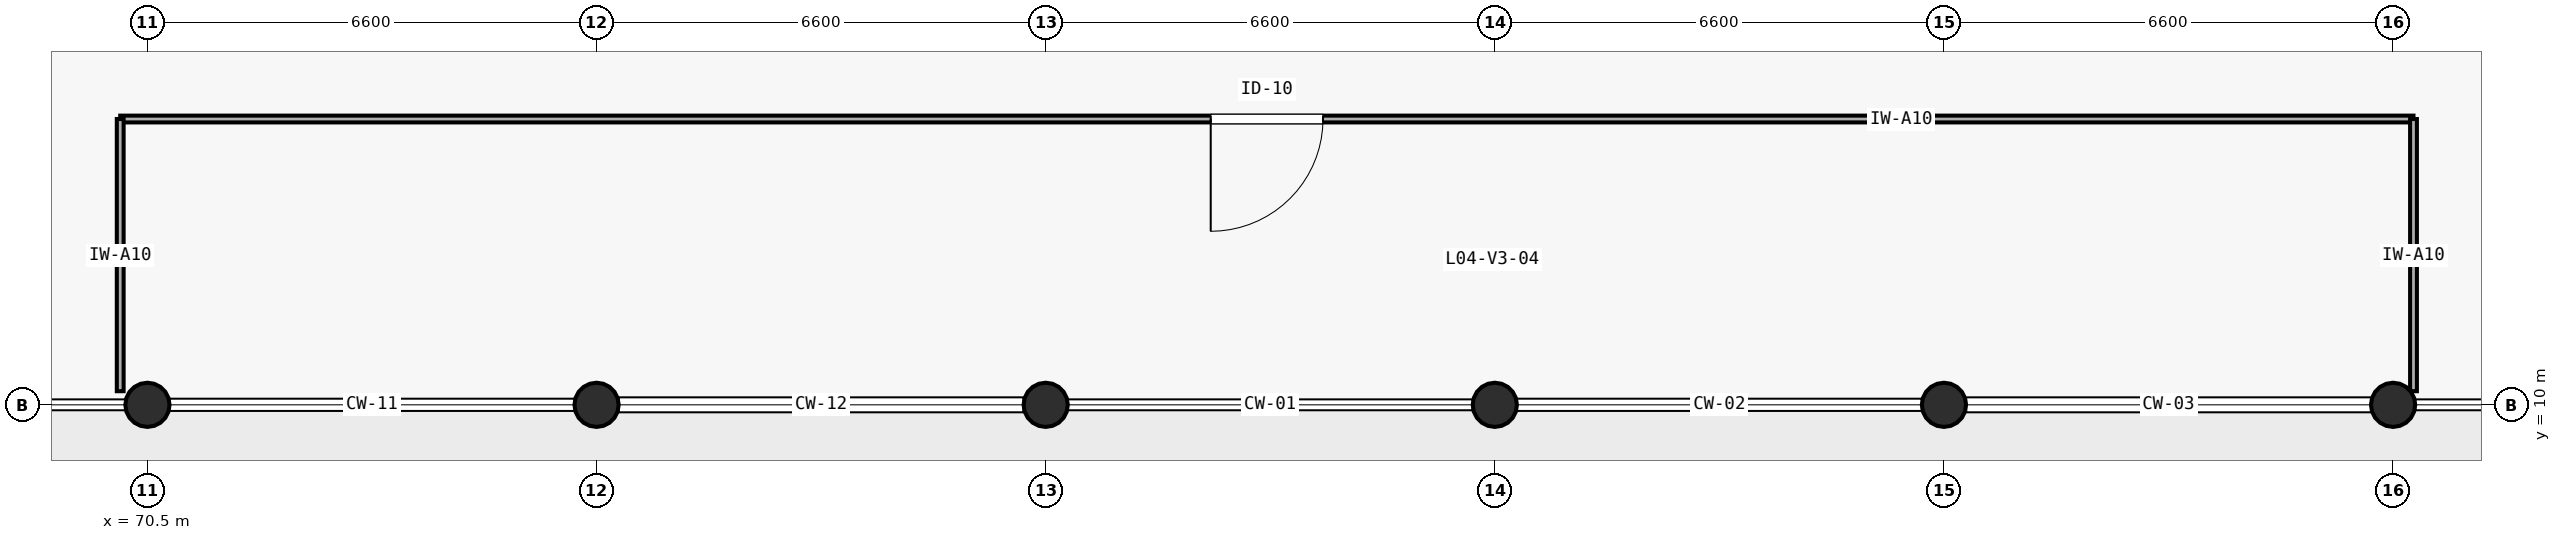
"""IFC4 building model, lengths in metres.
Left out: names, types, materials, properties, quantities, classifications, styles, units other than length and angle.
Written with IfcOpenShell. Run it as: python <this file> out.ifc"""

import sys

from ifc_helpers import new_model, si_unit, direction, frame, frame_2d, origin, origin_2d, place, context, subcontext, project, spatial, rectangle, circle, extrude, element, fill, save


model = new_model("IFC4")
c1 = context("Model", 3, precision=1e-05, world=origin(), true_north=direction((0.0, 1.0)))
c2 = subcontext(c1, "Body", "Model", "MODEL_VIEW")
j1 = project(units=[si_unit("LENGTHUNIT", "METRE"), si_unit("PLANEANGLEUNIT", "RADIAN")], contexts=[c1])
p1 = place(None, origin())
s1 = spatial("IfcSite", under=j1, at=p1, CompositionType="ELEMENT")
p2 = place(p1, origin())
s2 = spatial("IfcBuilding", under=s1, at=p2, CompositionType="ELEMENT")
p3 = place(p2, frame((0.0, 0.0, 16.8)))
s3 = spatial("IfcBuildingStorey", under=s2, at=p3, CompositionType="ELEMENT", Elevation=16.8)
for number, where, z_axis, x_axis in (
    (1, (70.5, 10.0, 0.0), (0.0, 0.0, 1.0), (1.0, 0.0, 0.0)),
    (2, (77.1, 10.0, 0.0), (0.0, 0.0, 1.0), (1.0, 0.0, 0.0)),
    (3, (83.7, 10.0, 0.0), (0.0, 0.0, 1.0), (1.0, 0.0, 0.0)),
    (4, (90.3, 10.0, 0.0), (0.0, 0.0, 1.0), (1.0, 0.0, 0.0)),
    (5, (96.9, 10.0, 0.0), (0.0, 0.0, 1.0), (1.0, 0.0, 0.0)),
    (6, (103.5, 10.0, 0.0), (0.0, 0.0, 1.0), (1.0, 0.0, 0.0)),
):
    element("IfcColumn", number, at=place(p3, frame(where, z_axis=z_axis, x_axis=x_axis)), inside=s3, PredefinedType="COLUMN", context=c2, shape_type="SweptSolid", body=[
        extrude(circle(Radius=0.325, at=origin_2d()), origin(), (0.0, 0.0, 1.0), 4.2),
    ])
p4 = place(p3, frame((70.1, 14.2, 0.0), z_axis=(0.0, 0.0, 1.0), x_axis=(1.0, 0.0, 0.0)))
e7 = element("IfcWall", 7, at=p4, inside=s3, PredefinedType="PARTITIONING", context=c2, shape_type="SweptSolid", body=[
    extrude(rectangle(XDim=33.7, YDim=0.1, at=frame_2d((16.85, 0.0))), origin(), (0.0, 0.0, 1.0), 3.9),
])
p5 = place(p4, frame((16.025, 0.0, 0.0)))
e8 = element("IfcOpeningElement", 8, at=p5, cuts=e7, PredefinedType="OPENING", context=c2, shape_type="SweptSolid", body=[
    extrude(rectangle(XDim=1.65, YDim=2.25, at=frame_2d((0.825, 1.125))), frame((0.0, 0.06, 0.0), z_axis=(0.0, -1.0, 0.0), x_axis=(1.0, 0.0, 0.0)), (0.0, 0.0, 1.0), 0.12),
])
for number, where, z_axis, x_axis in (
    (9, (70.1, 10.2, 0.0), (0.0, 0.0, 1.0), (0.0, 1.0, 0.0)),
    (10, (103.8, 10.2, 0.0), (0.0, 0.0, 1.0), (0.0, 1.0, 0.0)),
):
    element("IfcWall", number, at=place(p3, frame(where, z_axis=z_axis, x_axis=x_axis)), inside=s3, PredefinedType="PARTITIONING", context=c2, shape_type="SweptSolid", body=[
        extrude(rectangle(XDim=4.0, YDim=0.1, at=frame_2d((2.0, 0.0))), origin(), (0.0, 0.0, 1.0), 3.9),
    ])
p6 = place(p5, frame((1.65, 0.0, 0.0), z_axis=(0.0, 0.0, 1.0), x_axis=(-1.0, 0.0, 0.0)))
e11 = element("IfcDoor", 11, at=p6, inside=s3, OperationType="SINGLE_SWING_RIGHT", PredefinedType="DOOR", context=c2, shape_type="SweptSolid", body=[
    extrude(rectangle(XDim=1.65, YDim=2.25, at=frame_2d((0.825, 1.125))), frame((0.0, 0.025, 0.0), z_axis=(0.0, -1.0, 0.0), x_axis=(1.0, 0.0, 0.0)), (0.0, 0.0, 1.0), 0.05),
])
fill(e8, e11)
save(model, sys.argv[1])
